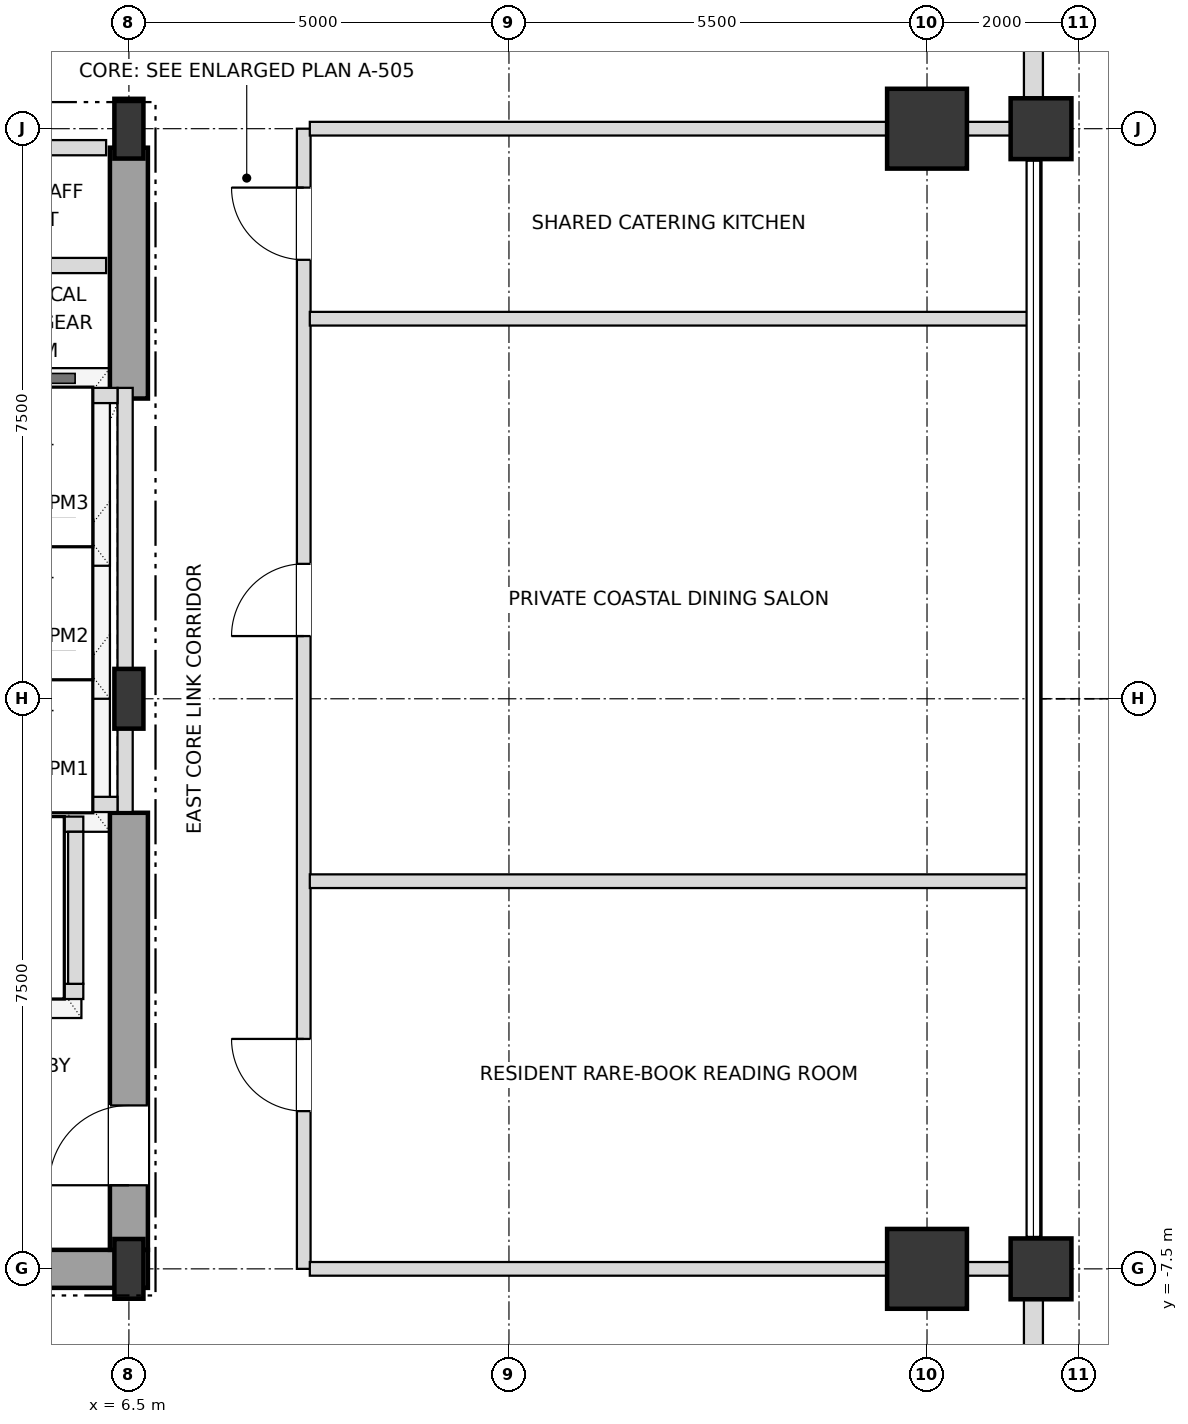
"""IFC4 building model, lengths in metres.
Left out: names, types, materials, properties, quantities, classifications, styles, units other than length and angle.
Written with IfcOpenShell. Run it as: python <this file> out.ifc"""

import sys

from ifc_helpers import new_model, si_unit, direction, frame, frame_2d, origin, origin_2d, place, context, subcontext, project, spatial, rectangle, i_section, extrude, element, fill, save


model = new_model("IFC4")
c1 = context("Model", 3, precision=1e-05, world=origin(), true_north=direction((0.0, 1.0)))
c2 = subcontext(c1, "Body", "Model", "MODEL_VIEW")
j1 = project(units=[si_unit("LENGTHUNIT", "METRE"), si_unit("PLANEANGLEUNIT", "RADIAN")], contexts=[c1])
p1 = place(None, origin())
s1 = spatial("IfcSite", under=j1, at=p1, CompositionType="ELEMENT")
p2 = place(p1, origin())
s2 = spatial("IfcBuilding", under=s1, at=p2, CompositionType="ELEMENT")
p3 = place(p2, frame((0.0, 0.0, 208.8)))
s3 = spatial("IfcBuildingStorey", under=s2, at=p3, CompositionType="ELEMENT", Elevation=208.8)
for number, where, z_axis, x_axis in (
    (1, (6.5, -7.5, 0.0), (0.0, 0.0, 1.0), (1.0, 0.0, 0.0)),
    (2, (6.5, 0.0, 0.0), (0.0, 0.0, 1.0), (1.0, 0.0, 0.0)),
    (3, (6.5, 7.5, 0.0), (0.0, 0.0, 1.0), (1.0, 0.0, 0.0)),
):
    element("IfcColumn", number, at=place(p3, frame(where, z_axis=z_axis, x_axis=x_axis)), inside=s3, PredefinedType="COLUMN", context=c2, shape_type="SweptSolid", body=[
        extrude(i_section(OverallWidth=0.382, OverallDepth=0.786, WebThickness=0.02, FlangeThickness=0.033, at=origin_2d()), origin(), (0.0, 0.0, 1.0), 3.6),
    ])
for number, where, z_axis, x_axis in (
    (4, (17.0, -7.5, 0.0), (0.0, 0.0, 1.0), (1.0, 0.0, 0.0)),
    (5, (17.0, 7.5, 0.0), (0.0, 0.0, 1.0), (1.0, 0.0, 0.0)),
):
    element("IfcColumn", number, at=place(p3, frame(where, z_axis=z_axis, x_axis=x_axis)), inside=s3, PredefinedType="USERDEFINED", context=c2, shape_type="SweptSolid", body=[
        extrude(rectangle(XDim=1.05, YDim=1.05, at=origin_2d()), origin(), (0.0, 0.0, 1.0), 3.6),
    ])
for number, where, z_axis, x_axis in (
    (6, (18.5, -7.5, 0.0), (0.0, 0.0, 1.0), (1.0, 0.0, 0.0)),
    (7, (18.5, 7.5, 0.0), (0.0, 0.0, 1.0), (1.0, 0.0, 0.0)),
):
    element("IfcColumn", number, at=place(p3, frame(where, z_axis=z_axis, x_axis=x_axis)), inside=s3, PredefinedType="COLUMN", context=c2, shape_type="SweptSolid", body=[
        extrude(rectangle(XDim=0.8, YDim=0.8, at=origin_2d()), origin(), (0.0, 0.0, 1.0), 3.6),
    ])
p4 = place(p3, frame((18.4, -12.605, 0.0), z_axis=(0.0, 0.0, 1.0), x_axis=(0.0, 1.0, 0.0)))
e8 = element("IfcWall", 8, at=p4, inside=s3, PredefinedType="SOLIDWALL", context=c2, shape_type="SweptSolid", body=[
    extrude(rectangle(XDim=4.71, YDim=0.25, at=frame_2d((2.355, 0.0))), origin(), (0.0, 0.0, 1.0), 2.59),
])
p5 = place(p4, frame((1.455, 0.0, 0.72)))
e9 = element("IfcOpeningElement", 9, at=p5, cuts=e8, PredefinedType="OPENING", context=c2, shape_type="SweptSolid", body=[
    extrude(rectangle(XDim=1.8, YDim=1.68, at=frame_2d((0.9, 0.84))), frame((0.0, 0.135, 0.0), z_axis=(0.0, -1.0, 0.0), x_axis=(1.0, 0.0, 0.0)), (0.0, 0.0, 1.0), 0.27),
])
p6 = place(p3, frame((18.4, 7.895, 0.0), z_axis=(0.0, 0.0, 1.0), x_axis=(0.0, 1.0, 0.0)))
e10 = element("IfcWall", 10, at=p6, inside=s3, PredefinedType="SOLIDWALL", context=c2, shape_type="SweptSolid", body=[
    extrude(rectangle(XDim=4.71, YDim=0.25, at=frame_2d((2.355, 0.0))), origin(), (0.0, 0.0, 1.0), 2.59),
])
p7 = place(p6, frame((1.455, 0.0, 0.72)))
e11 = element("IfcOpeningElement", 11, at=p7, cuts=e10, PredefinedType="OPENING", context=c2, shape_type="SweptSolid", body=[
    extrude(rectangle(XDim=1.8, YDim=1.68, at=frame_2d((0.9, 0.84))), frame((0.0, 0.135, 0.0), z_axis=(0.0, -1.0, 0.0), x_axis=(1.0, 0.0, 0.0)), (0.0, 0.0, 1.0), 0.27),
])
p8 = place(p3, frame((0.0, -7.5, 0.0), z_axis=(0.0, 0.0, 1.0), x_axis=(1.0, 0.0, 0.0)))
e12 = element("IfcWall", 12, at=p8, inside=s3, PredefinedType="SHEAR", context=c2, shape_type="SweptSolid", body=[
    extrude(rectangle(XDim=6.75, YDim=0.5, at=frame_2d((3.375, 0.0))), origin(), (0.0, 0.0, 1.0), 3.3),
])
p9 = place(p3, frame((6.5, -7.25, 0.0), z_axis=(0.0, 0.0, 1.0), x_axis=(0.0, 1.0, 0.0)))
e13 = element("IfcWall", 13, at=p9, inside=s3, PredefinedType="SHEAR", context=c2, shape_type="SweptSolid", body=[
    extrude(rectangle(XDim=5.75, YDim=0.5, at=frame_2d((2.875, 0.0))), origin(), (0.0, 0.0, 1.0), 3.3),
])
p10 = place(p9, frame((0.85, 0.0, 0.0)))
e14 = element("IfcOpeningElement", 14, at=p10, cuts=e13, PredefinedType="OPENING", context=c2, shape_type="SweptSolid", body=[
    extrude(rectangle(XDim=1.05, YDim=2.15, at=frame_2d((0.525, 1.075))), frame((0.0, 0.26, 0.0), z_axis=(0.0, -1.0, 0.0), x_axis=(1.0, 0.0, 0.0)), (0.0, 0.0, 1.0), 0.52),
])
p11 = place(p3, frame((6.5, 3.95, 0.0), z_axis=(0.0, 0.0, 1.0), x_axis=(0.0, 1.0, 0.0)))
e15 = element("IfcWall", 15, at=p11, inside=s3, PredefinedType="SHEAR", context=c2, shape_type="SweptSolid", body=[
    extrude(rectangle(XDim=3.3, YDim=0.5, at=frame_2d((1.65, 0.0))), origin(), (0.0, 0.0, 1.0), 3.3),
])
p12 = place(p3, frame((6.45, -1.49, 0.0), z_axis=(0.0, 0.0, 1.0), x_axis=(0.0, 1.0, 0.0)))
e16 = element("IfcWall", 16, at=p12, inside=s3, PredefinedType="SOLIDWALL", context=c2, shape_type="SweptSolid", body=[
    extrude(rectangle(XDim=5.58, YDim=0.2, at=frame_2d((2.79, 0.0))), origin(), (0.0, 0.0, 1.0), 2.746),
])
for number, where, z_axis, x_axis in (
    (17, (4.15, -1.39, 0.0), (0.0, 0.0, 1.0), (1.0, 0.0, 0.0)),
    (18, (4.15, 3.99, 0.0), (0.0, 0.0, 1.0), (1.0, 0.0, 0.0)),
):
    element("IfcWall", number, at=place(p3, frame(where, z_axis=z_axis, x_axis=x_axis)), inside=s3, PredefinedType="SOLIDWALL", context=c2, shape_type="SweptSolid", body=[
        extrude(rectangle(XDim=2.2, YDim=0.2, at=frame_2d((1.1, 0.0))), origin(), (0.0, 0.0, 1.0), 3.3),
    ])
p13 = place(p3, frame((1.8, -3.85, 0.0), z_axis=(0.0, 0.0, 1.0), x_axis=(1.0, 0.0, 0.0)))
e19 = element("IfcWall", 19, at=p13, inside=s3, PredefinedType="SOLIDWALL", context=c2, shape_type="SweptSolid", body=[
    extrude(rectangle(XDim=4.1, YDim=0.2, at=frame_2d((2.05, 0.0))), origin(), (0.0, 0.0, 1.0), 3.3),
])
p14 = place(p13, frame((0.45, 0.0, 0.0)))
e20 = element("IfcOpeningElement", 20, at=p14, cuts=e19, PredefinedType="OPENING", context=c2, shape_type="SweptSolid", body=[
    extrude(rectangle(XDim=1.2, YDim=2.2, at=frame_2d((0.6, 1.1))), frame((0.0, 0.11, 0.0), z_axis=(0.0, -1.0, 0.0), x_axis=(1.0, 0.0, 0.0)), (0.0, 0.0, 1.0), 0.22),
])
p15 = place(p13, frame((2.45, 0.0, 0.0)))
e21 = element("IfcOpeningElement", 21, at=p15, cuts=e19, PredefinedType="OPENING", context=c2, shape_type="SweptSolid", body=[
    extrude(rectangle(XDim=1.2, YDim=2.2, at=frame_2d((0.6, 1.1))), frame((0.0, 0.11, 0.0), z_axis=(0.0, -1.0, 0.0), x_axis=(1.0, 0.0, 0.0)), (0.0, 0.0, 1.0), 0.22),
])
p16 = place(p3, frame((1.8, -1.65, 0.0), z_axis=(0.0, 0.0, 1.0), x_axis=(1.0, 0.0, 0.0)))
e22 = element("IfcWall", 22, at=p16, inside=s3, PredefinedType="SOLIDWALL", context=c2, shape_type="SweptSolid", body=[
    extrude(rectangle(XDim=4.1, YDim=0.2, at=frame_2d((2.05, 0.0))), origin(), (0.0, 0.0, 1.0), 3.3),
])
p17 = place(p3, frame((5.8, -3.75, 0.0), z_axis=(0.0, 0.0, 1.0), x_axis=(0.0, 1.0, 0.0)))
e23 = element("IfcWall", 23, at=p17, inside=s3, PredefinedType="SOLIDWALL", context=c2, shape_type="SweptSolid", body=[
    extrude(rectangle(XDim=2.0, YDim=0.2, at=frame_2d((1.0, 0.0))), origin(), (0.0, 0.0, 1.0), 3.3),
])
p18 = place(p3, frame((8.8, -7.5, 0.0), z_axis=(0.0, 0.0, 1.0), x_axis=(0.0, 1.0, 0.0)))
e24 = element("IfcWall", 24, at=p18, inside=s3, PredefinedType="PARTITIONING", context=c2, shape_type="SweptSolid", body=[
    extrude(rectangle(XDim=15.0, YDim=0.18, at=frame_2d((7.5, 0.0))), origin(), (0.0, 0.0, 1.0), 3.3),
])
p19 = place(p18, frame((2.075, 0.0, 0.0)))
e25 = element("IfcOpeningElement", 25, at=p19, cuts=e24, PredefinedType="OPENING", context=c2, shape_type="SweptSolid", body=[
    extrude(rectangle(XDim=0.95, YDim=2.15, at=frame_2d((0.475, 1.075))), frame((0.0, 0.1, 0.0), z_axis=(0.0, -1.0, 0.0), x_axis=(1.0, 0.0, 0.0)), (0.0, 0.0, 1.0), 0.2),
])
p20 = place(p18, frame((8.325, 0.0, 0.0)))
e26 = element("IfcOpeningElement", 26, at=p20, cuts=e24, PredefinedType="OPENING", context=c2, shape_type="SweptSolid", body=[
    extrude(rectangle(XDim=0.95, YDim=2.15, at=frame_2d((0.475, 1.075))), frame((0.0, 0.1, 0.0), z_axis=(0.0, -1.0, 0.0), x_axis=(1.0, 0.0, 0.0)), (0.0, 0.0, 1.0), 0.2),
])
p21 = place(p18, frame((13.275, 0.0, 0.0)))
e27 = element("IfcOpeningElement", 27, at=p21, cuts=e24, PredefinedType="OPENING", context=c2, shape_type="SweptSolid", body=[
    extrude(rectangle(XDim=0.95, YDim=2.15, at=frame_2d((0.475, 1.075))), frame((0.0, 0.1, 0.0), z_axis=(0.0, -1.0, 0.0), x_axis=(1.0, 0.0, 0.0)), (0.0, 0.0, 1.0), 0.2),
])
p22 = place(p3, frame((8.88, -7.5, 0.0), z_axis=(0.0, 0.0, 1.0), x_axis=(1.0, 0.0, 0.0)))
e28 = element("IfcWall", 28, at=p22, inside=s3, PredefinedType="PARTITIONING", context=c2, shape_type="SweptSolid", body=[
    extrude(rectangle(XDim=9.52, YDim=0.18, at=frame_2d((4.76, 0.0))), origin(), (0.0, 0.0, 1.0), 2.746),
])
for number, where, z_axis, x_axis in (
    (29, (8.88, -2.4, 0.0), (0.0, 0.0, 1.0), (1.0, 0.0, 0.0)),
    (30, (8.88, 5.0, 0.0), (0.0, 0.0, 1.0), (1.0, 0.0, 0.0)),
):
    element("IfcWall", number, at=place(p3, frame(where, z_axis=z_axis, x_axis=x_axis)), inside=s3, PredefinedType="PARTITIONING", context=c2, shape_type="SweptSolid", body=[
        extrude(rectangle(XDim=9.44, YDim=0.18, at=frame_2d((4.72, 0.0))), origin(), (0.0, 0.0, 1.0), 2.746),
    ])
for number, where, z_axis, x_axis in (
    (31, (4.13, 5.7, 0.0), (0.0, 0.0, 1.0), (1.0, 0.0, 0.0)),
    (32, (4.13, 7.25, 0.0), (0.0, 0.0, 1.0), (1.0, 0.0, 0.0)),
):
    element("IfcWall", number, at=place(p3, frame(where, z_axis=z_axis, x_axis=x_axis)), inside=s3, PredefinedType="SOLIDWALL", context=c2, shape_type="SweptSolid", body=[
        extrude(rectangle(XDim=2.07, YDim=0.2, at=frame_2d((1.035, 0.0))), origin(), (0.0, 0.0, 1.0), 3.3),
    ])
p23 = place(p3, frame((8.88, 7.5, 0.0), z_axis=(0.0, 0.0, 1.0), x_axis=(1.0, 0.0, 0.0)))
e33 = element("IfcWall", 33, at=p23, inside=s3, PredefinedType="PARTITIONING", context=c2, shape_type="SweptSolid", body=[
    extrude(rectangle(XDim=9.52, YDim=0.18, at=frame_2d((4.76, 0.0))), origin(), (0.0, 0.0, 1.0), 2.746),
])
p24 = place(p10, origin())
e34 = element("IfcDoor", 34, at=p24, inside=s3, OperationType="SINGLE_SWING_LEFT", PredefinedType="DOOR", context=c2, shape_type="SweptSolid", body=[
    extrude(rectangle(XDim=1.05, YDim=2.15, at=frame_2d((0.525, 1.075))), frame((0.0, 0.025, 0.0), z_axis=(0.0, -1.0, 0.0), x_axis=(1.0, 0.0, 0.0)), (0.0, 0.0, 1.0), 0.05),
])
fill(e14, e34)
p25 = place(p19, origin())
e35 = element("IfcDoor", 35, at=p25, inside=s3, OperationType="SINGLE_SWING_RIGHT", PredefinedType="DOOR", context=c2, shape_type="SweptSolid", body=[
    extrude(rectangle(XDim=0.95, YDim=2.15, at=frame_2d((0.475, 1.075))), frame((0.0, 0.025, 0.0), z_axis=(0.0, -1.0, 0.0), x_axis=(1.0, 0.0, 0.0)), (0.0, 0.0, 1.0), 0.05),
])
fill(e25, e35)
p26 = place(p20, origin())
e36 = element("IfcDoor", 36, at=p26, inside=s3, OperationType="SINGLE_SWING_LEFT", PredefinedType="DOOR", context=c2, shape_type="SweptSolid", body=[
    extrude(rectangle(XDim=0.95, YDim=2.15, at=frame_2d((0.475, 1.075))), frame((0.0, 0.025, 0.0), z_axis=(0.0, -1.0, 0.0), x_axis=(1.0, 0.0, 0.0)), (0.0, 0.0, 1.0), 0.05),
])
fill(e26, e36)
p27 = place(p21, origin())
e37 = element("IfcDoor", 37, at=p27, inside=s3, OperationType="SINGLE_SWING_RIGHT", PredefinedType="DOOR", context=c2, shape_type="SweptSolid", body=[
    extrude(rectangle(XDim=0.95, YDim=2.15, at=frame_2d((0.475, 1.075))), frame((0.0, 0.025, 0.0), z_axis=(0.0, -1.0, 0.0), x_axis=(1.0, 0.0, 0.0)), (0.0, 0.0, 1.0), 0.05),
])
fill(e27, e37)
save(model, sys.argv[1])
